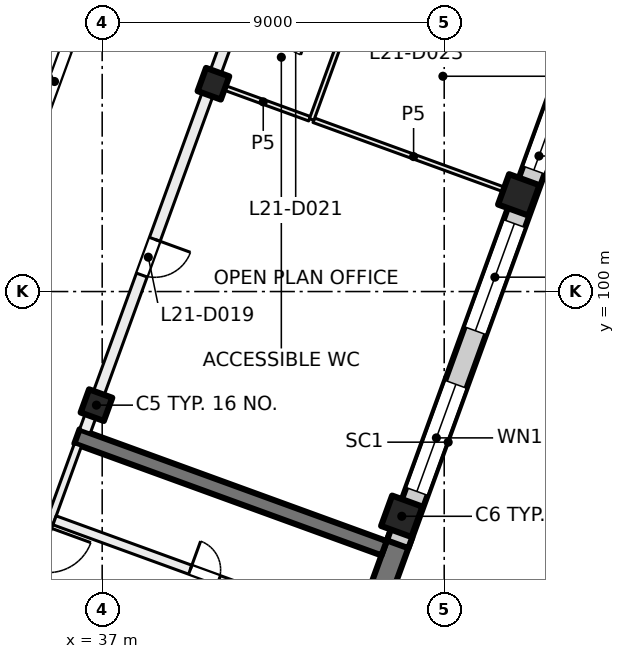
"""IFC4 building model, lengths in metres.
Left out: names, types, materials, properties, quantities, classifications, styles, units other than length and angle.
Written with IfcOpenShell. Run it as: python <this file> out.ifc"""

import sys

from ifc_helpers import new_model, si_unit, direction, frame, frame_2d, origin, origin_2d, place, context, subcontext, project, spatial, rectangle, extrude, element, fill, save


model = new_model("IFC4")
c1 = context("Model", 3, precision=1e-05, world=origin(), true_north=direction((0.0, 1.0)))
c2 = subcontext(c1, "Body", "Model", "MODEL_VIEW")
j1 = project(units=[si_unit("LENGTHUNIT", "METRE"), si_unit("PLANEANGLEUNIT", "RADIAN")], contexts=[c1])
p1 = place(None, origin())
s1 = spatial("IfcSite", under=j1, at=p1, CompositionType="ELEMENT")
p2 = place(p1, origin())
s2 = spatial("IfcBuilding", under=s1, at=p2, CompositionType="ELEMENT")
p3 = place(p2, frame((0.0, 0.0, 93.0)))
s3 = spatial("IfcBuildingStorey", under=s2, at=p3, CompositionType="ELEMENT", Elevation=93.0)
for number, where, z_axis, x_axis in (
    (1, (39.927, 105.468, 0.0), (0.0, 0.0, 1.0), (-0.342, -0.94, 0.0)),
    (2, (36.849, 97.011, 0.0), (0.0, 0.0, 1.0), (-0.342, -0.94, 0.0)),
):
    element("IfcColumn", number, at=place(p3, frame(where, z_axis=z_axis, x_axis=x_axis)), inside=s3, PredefinedType="COLUMN", context=c2, shape_type="SweptSolid", body=[
        extrude(rectangle(XDim=0.65, YDim=0.65, at=origin_2d()), origin(), (0.0, 0.0, 1.0), 4.0),
    ])
for number, where, z_axis, x_axis in (
    (3, (47.962, 102.544, 0.0), (0.0, 0.0, 1.0), (-0.342, -0.94, 0.0)),
    (4, (44.884, 94.087, 0.0), (0.0, 0.0, 1.0), (-0.342, -0.94, 0.0)),
):
    element("IfcColumn", number, at=place(p3, frame(where, z_axis=z_axis, x_axis=x_axis)), inside=s3, PredefinedType="COLUMN", context=c2, shape_type="SweptSolid", body=[
        extrude(rectangle(XDim=0.85, YDim=0.85, at=origin_2d()), origin(), (0.0, 0.0, 1.0), 4.0),
    ])
p4 = place(p3, frame((41.827, 85.249, 0.0), z_axis=(0.0, 0.0, 1.0), x_axis=(0.342017595281, 0.939693548195, 0.0)))
e5 = element("IfcWall", 5, at=p4, inside=s3, PredefinedType="SHEAR", context=c2, shape_type="SweptSolid", body=[
    extrude(rectangle(XDim=8.925, YDim=0.6, at=frame_2d((4.462, 0.0))), origin(), (0.0, 0.0, 1.0), 4.0),
])
p5 = place(p3, frame((44.418, 93.245, 0.0), z_axis=(0.0, 0.0, 1.0), x_axis=(-0.93969060187, 0.342025690201, 0.0)))
e6 = element("IfcWall", 6, at=p5, inside=s3, PredefinedType="SHEAR", context=c2, shape_type="SweptSolid", body=[
    extrude(rectangle(XDim=8.6, YDim=0.4, at=frame_2d((4.3, 0.0))), origin(), (0.0, 0.0, 1.0), 4.0),
])
p6 = place(p3, frame((52.212, 113.783, 0.0), z_axis=(0.0, 0.0, 1.0), x_axis=(-0.34202521188, -0.939690775968, 0.0)))
e7 = element("IfcWall", 7, at=p6, inside=s3, PredefinedType="SOLIDWALL", context=c2, shape_type="SweptSolid", body=[
    extrude(rectangle(XDim=21.745, YDim=0.6, at=frame_2d((10.873, 0.0))), origin(), (0.0, 0.0, 1.0), 3.625),
])
p7 = place(p6, frame((3.765, 0.0, 0.9)))
e8 = element("IfcOpeningElement", 8, at=p7, cuts=e7, PredefinedType="OPENING", context=c2, shape_type="SweptSolid", body=[
    extrude(rectangle(XDim=3.0, YDim=2.4, at=frame_2d((1.5, 1.2))), frame((0.0, 0.31, 0.0), z_axis=(0.0, -1.0, 0.0), x_axis=(1.0, 0.0, 0.0)), (0.0, 0.0, 1.0), 0.62),
])
p8 = place(p6, frame((8.265, 0.0, 0.9)))
e9 = element("IfcOpeningElement", 9, at=p8, cuts=e7, PredefinedType="OPENING", context=c2, shape_type="SweptSolid", body=[
    extrude(rectangle(XDim=3.0, YDim=2.4, at=frame_2d((1.5, 1.2))), frame((0.0, 0.31, 0.0), z_axis=(0.0, -1.0, 0.0), x_axis=(1.0, 0.0, 0.0)), (0.0, 0.0, 1.0), 0.62),
])
p9 = place(p6, frame((12.765, 0.0, 0.9)))
e10 = element("IfcOpeningElement", 10, at=p9, cuts=e7, PredefinedType="OPENING", context=c2, shape_type="SweptSolid", body=[
    extrude(rectangle(XDim=3.0, YDim=2.4, at=frame_2d((1.5, 1.2))), frame((0.0, 0.31, 0.0), z_axis=(0.0, -1.0, 0.0), x_axis=(1.0, 0.0, 0.0)), (0.0, 0.0, 1.0), 0.62),
])
p10 = place(p6, frame((17.265, 0.0, 0.9)))
e11 = element("IfcOpeningElement", 11, at=p10, cuts=e7, PredefinedType="OPENING", context=c2, shape_type="SweptSolid", body=[
    extrude(rectangle(XDim=3.0, YDim=2.4, at=frame_2d((1.5, 1.2))), frame((0.0, 0.31, 0.0), z_axis=(0.0, -1.0, 0.0), x_axis=(1.0, 0.0, 0.0)), (0.0, 0.0, 1.0), 0.62),
])
p11 = place(p3, frame((24.666, 100.669, 0.0), z_axis=(0.0, 0.0, 1.0), x_axis=(0.34201964167, 0.939692803373, 0.0)))
e12 = element("IfcWall", 12, at=p11, inside=s3, PredefinedType="SOLIDWALL", context=c2, shape_type="SweptSolid", body=[
    extrude(rectangle(XDim=32.884, YDim=0.6, at=frame_2d((16.442, 0.0))), origin(), (0.0, 0.0, 1.0), 3.625),
])
p12 = place(p11, frame((1.48, 0.0, 0.9)))
e13 = element("IfcOpeningElement", 13, at=p12, cuts=e12, PredefinedType="OPENING", context=c2, shape_type="SweptSolid", body=[
    extrude(rectangle(XDim=3.0, YDim=2.4, at=frame_2d((1.5, 1.2))), frame((0.0, 0.31, 0.0), z_axis=(0.0, -1.0, 0.0), x_axis=(1.0, 0.0, 0.0)), (0.0, 0.0, 1.0), 0.62),
])
p13 = place(p11, frame((5.98, 0.0, 0.9)))
e14 = element("IfcOpeningElement", 14, at=p13, cuts=e12, PredefinedType="OPENING", context=c2, shape_type="SweptSolid", body=[
    extrude(rectangle(XDim=3.0, YDim=2.4, at=frame_2d((1.5, 1.2))), frame((0.0, 0.31, 0.0), z_axis=(0.0, -1.0, 0.0), x_axis=(1.0, 0.0, 0.0)), (0.0, 0.0, 1.0), 0.62),
])
p14 = place(p11, frame((10.48, 0.0, 0.9)))
e15 = element("IfcOpeningElement", 15, at=p14, cuts=e12, PredefinedType="OPENING", context=c2, shape_type="SweptSolid", body=[
    extrude(rectangle(XDim=3.0, YDim=2.4, at=frame_2d((1.5, 1.2))), frame((0.0, 0.31, 0.0), z_axis=(0.0, -1.0, 0.0), x_axis=(1.0, 0.0, 0.0)), (0.0, 0.0, 1.0), 0.62),
])
p15 = place(p11, frame((15.58, 0.0, 0.0)))
e16 = element("IfcOpeningElement", 16, at=p15, cuts=e12, PredefinedType="OPENING", context=c2, shape_type="SweptSolid", body=[
    extrude(rectangle(XDim=1.8, YDim=2.4, at=frame_2d((0.9, 1.2))), frame((0.0, 0.31, 0.0), z_axis=(0.0, -1.0, 0.0), x_axis=(1.0, 0.0, 0.0)), (0.0, 0.0, 1.0), 0.62),
])
p16 = place(p11, frame((19.48, 0.0, 0.9)))
e17 = element("IfcOpeningElement", 17, at=p16, cuts=e12, PredefinedType="OPENING", context=c2, shape_type="SweptSolid", body=[
    extrude(rectangle(XDim=3.0, YDim=2.4, at=frame_2d((1.5, 1.2))), frame((0.0, 0.31, 0.0), z_axis=(0.0, -1.0, 0.0), x_axis=(1.0, 0.0, 0.0)), (0.0, 0.0, 1.0), 0.62),
])
p17 = place(p11, frame((23.98, 0.0, 0.9)))
e18 = element("IfcOpeningElement", 18, at=p17, cuts=e12, PredefinedType="OPENING", context=c2, shape_type="SweptSolid", body=[
    extrude(rectangle(XDim=3.0, YDim=2.4, at=frame_2d((1.5, 1.2))), frame((0.0, 0.31, 0.0), z_axis=(0.0, -1.0, 0.0), x_axis=(1.0, 0.0, 0.0)), (0.0, 0.0, 1.0), 0.62),
])
p18 = place(p11, frame((29.08, 0.0, 0.0)))
e19 = element("IfcOpeningElement", 19, at=p18, cuts=e12, PredefinedType="OPENING", context=c2, shape_type="SweptSolid", body=[
    extrude(rectangle(XDim=1.8, YDim=2.4, at=frame_2d((0.9, 1.2))), frame((0.0, 0.31, 0.0), z_axis=(0.0, -1.0, 0.0), x_axis=(1.0, 0.0, 0.0)), (0.0, 0.0, 1.0), 0.62),
])
p19 = place(p3, frame((36.362, 95.964, 0.0), z_axis=(0.0, 0.0, 1.0), x_axis=(-0.341995824804, -0.939701471648, 0.0)))
e20 = element("IfcWall", 20, at=p19, inside=s3, PredefinedType="PARTITIONING", context=c2, shape_type="SweptSolid", body=[
    extrude(rectangle(XDim=3.8, YDim=0.2, at=frame_2d((1.9, 0.0))), origin(), (0.0, 0.0, 1.0), 3.625),
])
p20 = place(p19, frame((2.3, 0.0, 0.0)))
e21 = element("IfcOpeningElement", 21, at=p20, cuts=e20, PredefinedType="OPENING", context=c2, shape_type="SweptSolid", body=[
    extrude(rectangle(XDim=1.2, YDim=2.1, at=frame_2d((0.6, 1.05))), frame((0.0, 0.11, 0.0), z_axis=(0.0, -1.0, 0.0), x_axis=(1.0, 0.0, 0.0)), (0.0, 0.0, 1.0), 0.22),
])
p21 = place(p3, frame((35.19, 92.453, 0.0), z_axis=(0.0, 0.0, 1.0), x_axis=(0.939691552312, -0.342023078919, 0.0)))
e22 = element("IfcWall", 22, at=p21, inside=s3, PredefinedType="PARTITIONING", context=c2, shape_type="SweptSolid", body=[
    extrude(rectangle(XDim=8.4, YDim=0.2, at=frame_2d((4.2, 0.0))), origin(), (0.0, 0.0, 1.0), 3.625),
])
p22 = place(p21, frame((5.25, 0.0, 0.0)))
e23 = element("IfcOpeningElement", 23, at=p22, cuts=e22, PredefinedType="OPENING", context=c2, shape_type="SweptSolid", body=[
    extrude(rectangle(XDim=1.5, YDim=2.1, at=frame_2d((0.75, 1.05))), frame((0.0, 0.11, 0.0), z_axis=(0.0, -1.0, 0.0), x_axis=(1.0, 0.0, 0.0)), (0.0, 0.0, 1.0), 0.22),
])
p23 = place(p3, frame((35.746, 93.98, 0.0), z_axis=(0.0, 0.0, 1.0), x_axis=(0.939691552312, -0.342023078919, 0.0)))
e24 = element("IfcWall", 24, at=p23, inside=s3, PredefinedType="PARTITIONING", context=c2, shape_type="SweptSolid", body=[
    extrude(rectangle(XDim=8.4, YDim=0.25, at=frame_2d((4.2, 0.0))), origin(), (0.0, 0.0, 1.0), 3.625),
])
p24 = place(p23, frame((3.8, 0.0, 0.0)))
e25 = element("IfcOpeningElement", 25, at=p24, cuts=e24, PredefinedType="OPENING", context=c2, shape_type="SweptSolid", body=[
    extrude(rectangle(XDim=0.8, YDim=2.1, at=frame_2d((0.4, 1.05))), frame((0.0, 0.135, 0.0), z_axis=(0.0, -1.0, 0.0), x_axis=(1.0, 0.0, 0.0)), (0.0, 0.0, 1.0), 0.27),
])
p25 = place(p3, frame((32.881, 97.657, 0.0), z_axis=(0.0, 0.0, 1.0), x_axis=(0.342017360004, 0.939693633828, 0.0)))
e26 = element("IfcWall", 26, at=p25, inside=s3, PredefinedType="PARTITIONING", context=c2, shape_type="SweptSolid", body=[
    extrude(rectangle(XDim=34.516, YDim=0.3, at=frame_2d((17.258, 0.0))), origin(), (0.0, 0.0, 1.0), 3.625),
])
p26 = place(p25, frame((7.475, 0.0, 0.0)))
e27 = element("IfcOpeningElement", 27, at=p26, cuts=e26, PredefinedType="OPENING", context=c2, shape_type="SweptSolid", body=[
    extrude(rectangle(XDim=1.8, YDim=2.1, at=frame_2d((0.9, 1.05))), frame((0.0, 0.16, 0.0), z_axis=(0.0, -1.0, 0.0), x_axis=(1.0, 0.0, 0.0)), (0.0, 0.0, 1.0), 0.32),
])
p27 = place(p25, frame((25.0, 0.0, 0.0)))
e28 = element("IfcOpeningElement", 28, at=p27, cuts=e26, PredefinedType="OPENING", context=c2, shape_type="SweptSolid", body=[
    extrude(rectangle(XDim=1.0, YDim=2.1, at=frame_2d((0.5, 1.05))), frame((0.0, 0.16, 0.0), z_axis=(0.0, -1.0, 0.0), x_axis=(1.0, 0.0, 0.0)), (0.0, 0.0, 1.0), 0.32),
])
p28 = place(p25, frame((29.779, 0.0, 0.0)))
e29 = element("IfcOpeningElement", 29, at=p28, cuts=e26, PredefinedType="OPENING", context=c2, shape_type="SweptSolid", body=[
    extrude(rectangle(XDim=1.8, YDim=2.1, at=frame_2d((0.9, 1.05))), frame((0.0, 0.16, 0.0), z_axis=(0.0, -1.0, 0.0), x_axis=(1.0, 0.0, 0.0)), (0.0, 0.0, 1.0), 0.32),
])
p29 = place(p3, frame((40.021, 105.434, 0.0), z_axis=(0.0, 0.0, 1.0), x_axis=(0.939564838351, -0.342371018829, 0.0)))
e30 = element("IfcWall", 30, at=p29, inside=s3, PredefinedType="PARTITIONING", context=c2, shape_type="SweptSolid", body=[
    extrude(rectangle(XDim=2.591, YDim=0.125, at=frame_2d((1.295, 0.0))), origin(), (0.0, 0.0, 1.0), 3.625),
])
p30 = place(p3, frame((42.568, 104.507, 0.0), z_axis=(0.0, 0.0, 1.0), x_axis=(0.939681160367, -0.342051628927, 0.0)))
e31 = element("IfcWall", 31, at=p30, inside=s3, PredefinedType="PARTITIONING", context=c2, shape_type="SweptSolid", body=[
    extrude(rectangle(XDim=5.59, YDim=0.125, at=frame_2d((2.795, 0.0))), origin(), (0.0, 0.0, 1.0), 3.625),
])
p31 = place(p3, frame((45.569, 112.926, 0.0), z_axis=(0.0, 0.0, 1.0), x_axis=(-0.342072050759, -0.939673726402, 0.0)))
e32 = element("IfcWall", 32, at=p31, inside=s3, PredefinedType="PARTITIONING", context=c2, shape_type="SweptSolid", body=[
    extrude(rectangle(XDim=8.937, YDim=0.125, at=frame_2d((4.469, 0.0))), origin(), (0.0, 0.0, 1.0), 3.625),
])
p32 = place(p31, frame((1.809, 0.0, 0.0)))
e33 = element("IfcOpeningElement", 33, at=p32, cuts=e32, PredefinedType="OPENING", context=c2, shape_type="SweptSolid", body=[
    extrude(rectangle(XDim=0.8, YDim=2.1, at=frame_2d((0.4, 1.05))), frame((0.0, 0.073, 0.0), z_axis=(0.0, -1.0, 0.0), x_axis=(1.0, 0.0, 0.0)), (0.0, 0.0, 1.0), 0.145),
])
p33 = place(p31, frame((5.039, 0.0, 0.0)))
e34 = element("IfcOpeningElement", 34, at=p33, cuts=e32, PredefinedType="OPENING", context=c2, shape_type="SweptSolid", body=[
    extrude(rectangle(XDim=0.8, YDim=2.1, at=frame_2d((0.4, 1.05))), frame((0.0, 0.073, 0.0), z_axis=(0.0, -1.0, 0.0), x_axis=(1.0, 0.0, 0.0)), (0.0, 0.0, 1.0), 0.145),
])
p34 = place(p3, frame((47.314, 125.909, 0.0), z_axis=(0.0, 0.0, 1.0), x_axis=(-0.342010770371, -0.939696032209, 0.0)))
e35 = element("IfcWall", 35, at=p34, inside=s3, PredefinedType="PARTITIONING", context=c2, shape_type="SweptSolid", body=[
    extrude(rectangle(XDim=31.485, YDim=0.3, at=frame_2d((15.742, 0.0))), origin(), (0.0, 0.0, 1.0), 3.625),
])
p35 = place(p34, frame((26.11, 0.0, 0.0)))
e36 = element("IfcOpeningElement", 36, at=p35, cuts=e35, PredefinedType="OPENING", context=c2, shape_type="SweptSolid", body=[
    extrude(rectangle(XDim=1.0, YDim=2.1, at=frame_2d((0.5, 1.05))), frame((0.0, 0.16, 0.0), z_axis=(0.0, -1.0, 0.0), x_axis=(1.0, 0.0, 0.0)), (0.0, 0.0, 1.0), 0.32),
])
p36 = place(p34, frame((15.485, 0.0, 0.0)))
e37 = element("IfcOpeningElement", 37, at=p36, cuts=e35, PredefinedType="OPENING", context=c2, shape_type="SweptSolid", body=[
    extrude(rectangle(XDim=1.0, YDim=2.1, at=frame_2d((0.5, 1.05))), frame((0.0, 0.16, 0.0), z_axis=(0.0, -1.0, 0.0), x_axis=(1.0, 0.0, 0.0)), (0.0, 0.0, 1.0), 0.32),
])
p37 = place(p34, frame((9.985, 0.0, 0.0)))
e38 = element("IfcOpeningElement", 38, at=p37, cuts=e35, PredefinedType="OPENING", context=c2, shape_type="SweptSolid", body=[
    extrude(rectangle(XDim=1.0, YDim=2.1, at=frame_2d((0.5, 1.05))), frame((0.0, 0.16, 0.0), z_axis=(0.0, -1.0, 0.0), x_axis=(1.0, 0.0, 0.0)), (0.0, 0.0, 1.0), 0.32),
])
p38 = place(p34, frame((5.484, 0.0, 0.0)))
e39 = element("IfcOpeningElement", 39, at=p38, cuts=e35, PredefinedType="OPENING", context=c2, shape_type="SweptSolid", body=[
    extrude(rectangle(XDim=1.0, YDim=2.1, at=frame_2d((0.5, 1.05))), frame((0.0, 0.16, 0.0), z_axis=(0.0, -1.0, 0.0), x_axis=(1.0, 0.0, 0.0)), (0.0, 0.0, 1.0), 0.32),
])
p39 = place(p8, origin())
e40 = element("IfcWindow", 40, at=p39, inside=s3, PartitioningType="SINGLE_PANEL", PredefinedType="WINDOW", context=c2, shape_type="SweptSolid", body=[
    extrude(rectangle(XDim=3.0, YDim=2.4, at=frame_2d((1.5, 1.2))), frame((0.0, 0.03, 0.0), z_axis=(0.0, -1.0, 0.0), x_axis=(1.0, 0.0, 0.0)), (0.0, 0.0, 1.0), 0.06),
])
fill(e9, e40)
p40 = place(p9, origin())
e41 = element("IfcWindow", 41, at=p40, inside=s3, PartitioningType="SINGLE_PANEL", PredefinedType="WINDOW", context=c2, shape_type="SweptSolid", body=[
    extrude(rectangle(XDim=3.0, YDim=2.4, at=frame_2d((1.5, 1.2))), frame((0.0, 0.03, 0.0), z_axis=(0.0, -1.0, 0.0), x_axis=(1.0, 0.0, 0.0)), (0.0, 0.0, 1.0), 0.06),
])
fill(e10, e41)
p41 = place(p10, origin())
e42 = element("IfcWindow", 42, at=p41, inside=s3, PartitioningType="SINGLE_PANEL", PredefinedType="WINDOW", context=c2, shape_type="SweptSolid", body=[
    extrude(rectangle(XDim=3.0, YDim=2.4, at=frame_2d((1.5, 1.2))), frame((0.0, 0.03, 0.0), z_axis=(0.0, -1.0, 0.0), x_axis=(1.0, 0.0, 0.0)), (0.0, 0.0, 1.0), 0.06),
])
fill(e11, e42)
p42 = place(p24, origin())
e43 = element("IfcDoor", 43, at=p42, inside=s3, OperationType="SINGLE_SWING_RIGHT", PredefinedType="DOOR", context=c2, shape_type="SweptSolid", body=[
    extrude(rectangle(XDim=0.8, YDim=2.1, at=frame_2d((0.4, 1.05))), frame((0.0, 0.025, 0.0), z_axis=(0.0, -1.0, 0.0), x_axis=(1.0, 0.0, 0.0)), (0.0, 0.0, 1.0), 0.05),
])
fill(e25, e43)
p43 = place(p26, origin())
e44 = element("IfcDoor", 44, at=p43, inside=s3, OperationType="DOUBLE_DOOR_SINGLE_SWING", PredefinedType="DOOR", context=c2, shape_type="SweptSolid", body=[
    extrude(rectangle(XDim=1.8, YDim=2.1, at=frame_2d((0.9, 1.05))), frame((0.0, 0.025, 0.0), z_axis=(0.0, -1.0, 0.0), x_axis=(1.0, 0.0, 0.0)), (0.0, 0.0, 1.0), 0.05),
])
fill(e27, e44)
p44 = place(p35, origin())
e45 = element("IfcDoor", 45, at=p44, inside=s3, OperationType="SINGLE_SWING_RIGHT", PredefinedType="DOOR", context=c2, shape_type="SweptSolid", body=[
    extrude(rectangle(XDim=1.0, YDim=2.1, at=frame_2d((0.5, 1.05))), frame((0.0, 0.025, 0.0), z_axis=(0.0, -1.0, 0.0), x_axis=(1.0, 0.0, 0.0)), (0.0, 0.0, 1.0), 0.05),
])
fill(e36, e45)
save(model, sys.argv[1])
